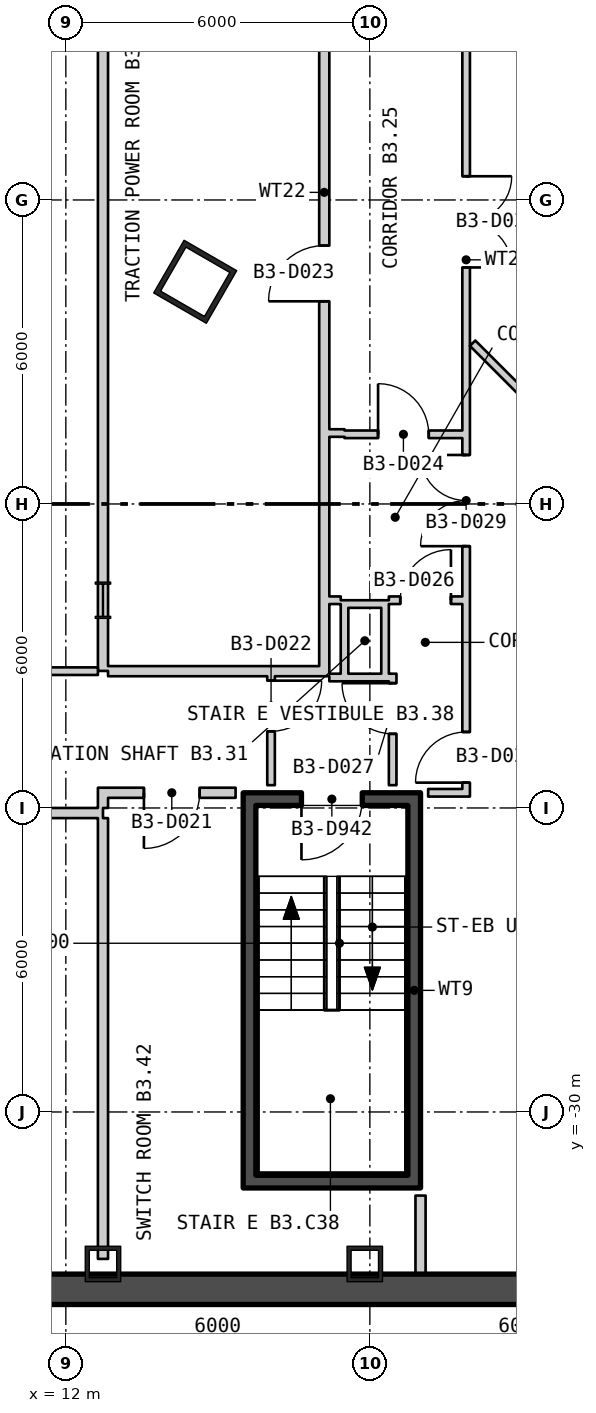
"""IFC4 building model, lengths in metres.
Left out: names, types, materials, properties, quantities, classifications, styles, units other than length and angle.
Written with IfcOpenShell. Run it as: python <this file> out.ifc"""

import sys

from ifc_helpers import new_model, si_unit, direction, frame, frame_2d, origin, origin_2d, place, context, subcontext, project, spatial, rectangle, hollow_rectangle, i_section, extrude, element, fill, save


model = new_model("IFC4")
c1 = context("Model", 3, precision=1e-05, world=origin(), true_north=direction((0.0, 1.0)))
c2 = subcontext(c1, "Body", "Model", "MODEL_VIEW")
j1 = project(units=[si_unit("LENGTHUNIT", "METRE"), si_unit("PLANEANGLEUNIT", "RADIAN")], contexts=[c1])
p1 = place(None, origin())
s1 = spatial("IfcSite", under=j1, at=p1, CompositionType="ELEMENT")
p2 = place(p1, origin())
s2 = spatial("IfcBuilding", under=s1, at=p2, CompositionType="ELEMENT")
p3 = place(p2, frame((0.0, 0.0, -16.8)))
s3 = spatial("IfcBuildingStorey", under=s2, at=p3, CompositionType="ELEMENT", Elevation=-16.8)
p4 = place(p3, frame((14.553, -13.615, 0.0), z_axis=(0.0, 0.0, 1.0), x_axis=(0.5, 0.866025403784, 0.0)))
e1 = element("IfcColumn", 1, at=p4, inside=s3, PredefinedType="COLUMN", context=c2, shape_type="SweptSolid", body=[
    extrude(hollow_rectangle(XDim=1.2, YDim=1.2, WallThickness=0.1, at=origin_2d()), origin(), (0.0, 0.0, 1.0), 5.4),
])
for number, where, z_axis, x_axis in (
    (2, (12.733, -33.0, 0.0), (0.0, 0.0, 1.0), (1.0, 0.0, 0.0)),
    (3, (17.9, -33.0, 0.0), (0.0, 0.0, 1.0), (1.0, 0.0, 0.0)),
):
    element("IfcColumn", number, at=place(p3, frame(where, z_axis=z_axis, x_axis=x_axis)), inside=s3, PredefinedType="COLUMN", context=c2, shape_type="SweptSolid", body=[
        extrude(hollow_rectangle(XDim=0.7, YDim=0.7, WallThickness=0.08, at=origin_2d()), origin(), (0.0, 0.0, 1.0), 5.4),
    ])
p5 = place(p3, frame((12.733, -19.9, 0.0), z_axis=(0.0, 0.0, 1.0), x_axis=(1.0, 0.0, 0.0)))
e4 = element("IfcColumn", 4, at=p5, inside=s3, PredefinedType="COLUMN", context=c2, shape_type="SweptSolid", body=[
    extrude(i_section(OverallWidth=0.304, OverallDepth=0.716, WebThickness=0.021, FlangeThickness=0.04, at=origin_2d()), origin(), (0.0, 0.0, 1.0), 5.4),
])
p6 = place(p3, frame((-39.0, -33.5, -0.4), z_axis=(0.0, 0.0, 1.0), x_axis=(1.0, 0.0, 0.0)))
e5 = element("IfcWall", 5, at=p6, inside=s3, PredefinedType="STANDARD", context=c2, shape_type="SweptSolid", body=[
    extrude(rectangle(XDim=78.0, YDim=0.6, at=frame_2d((39.0, 0.0))), origin(), (0.0, 0.0, 1.0), 5.4),
])
for number, where, z_axis, x_axis in (
    (6, (15.625, -31.25, 0.0), (0.0, 0.0, 1.0), (0.0, 1.0, 0.0)),
    (7, (18.875, -31.25, 0.0), (0.0, 0.0, 1.0), (0.0, 1.0, 0.0)),
):
    element("IfcWall", number, at=place(p3, frame(where, z_axis=z_axis, x_axis=x_axis)), inside=s3, PredefinedType="SHEAR", context=c2, shape_type="SweptSolid", body=[
        extrude(rectangle(XDim=7.3, YDim=0.25, at=frame_2d((3.65, 0.0))), origin(), (0.0, 0.0, 1.0), 4.95),
    ])
p7 = place(p3, frame((15.5, -31.375, 0.0), z_axis=(0.0, 0.0, 1.0), x_axis=(1.0, 0.0, 0.0)))
e8 = element("IfcWall", 8, at=p7, inside=s3, PredefinedType="SHEAR", context=c2, shape_type="SweptSolid", body=[
    extrude(rectangle(XDim=3.5, YDim=0.25, at=frame_2d((1.75, 0.0))), origin(), (0.0, 0.0, 1.0), 4.95),
])
p8 = place(p3, frame((15.5, -23.825, 0.0), z_axis=(0.0, 0.0, 1.0), x_axis=(1.0, 0.0, 0.0)))
e9 = element("IfcWall", 9, at=p8, inside=s3, PredefinedType="SHEAR", context=c2, shape_type="SweptSolid", body=[
    extrude(rectangle(XDim=3.5, YDim=0.25, at=frame_2d((1.75, 0.0))), origin(), (0.0, 0.0, 1.0), 4.95),
])
p9 = place(p8, frame((1.15, 0.0, 0.0)))
e10 = element("IfcOpeningElement", 10, at=p9, cuts=e9, PredefinedType="OPENING", context=c2, shape_type="SweptSolid", body=[
    extrude(rectangle(XDim=1.2, YDim=2.1, at=frame_2d((0.6, 1.05))), frame((0.0, 0.135, 0.0), z_axis=(0.0, -1.0, 0.0), x_axis=(1.0, 0.0, 0.0)), (0.0, 0.0, 1.0), 0.27),
])
p10 = place(p3, frame((1.7, -21.3, 0.0), z_axis=(0.0, 0.0, 1.0), x_axis=(1.0, 0.0, 0.0)))
e11 = element("IfcWall", 11, at=p10, inside=s3, PredefinedType="PARTITIONING", context=c2, shape_type="SweptSolid", body=[
    extrude(rectangle(XDim=10.933, YDim=0.15, at=frame_2d((5.466, 0.0))), origin(), (0.0, 0.0, 1.0), 4.95),
])
p11 = place(p3, frame((3.035, -24.1, 0.0), z_axis=(0.0, 0.0, 1.0), x_axis=(1.0, 0.0, 0.0)))
e12 = element("IfcWall", 12, at=p11, inside=s3, PredefinedType="PARTITIONING", context=c2, shape_type="SweptSolid", body=[
    extrude(rectangle(XDim=9.698, YDim=0.2, at=frame_2d((4.849, 0.0))), origin(), (0.0, 0.0, 1.0), 4.95),
])
p12 = place(p11, frame((4.123, 0.0, 0.0)))
e13 = element("IfcOpeningElement", 13, at=p12, cuts=e12, PredefinedType="OPENING", context=c2, shape_type="SweptSolid", body=[
    extrude(rectangle(XDim=1.1, YDim=2.1, at=frame_2d((0.55, 1.05))), frame((0.0, 0.11, 0.0), z_axis=(0.0, -1.0, 0.0), x_axis=(1.0, 0.0, 0.0)), (0.0, 0.0, 1.0), 0.22),
])
p13 = place(p3, frame((12.733, -32.9, 0.0), z_axis=(0.0, 0.0, 1.0), x_axis=(0.0, 1.0, 0.0)))
e14 = element("IfcWall", 14, at=p13, inside=s3, PredefinedType="PARTITIONING", context=c2, shape_type="SweptSolid", body=[
    extrude(rectangle(XDim=8.7, YDim=0.2, at=frame_2d((4.35, 0.0))), origin(), (0.0, 0.0, 1.0), 4.95),
])
p14 = place(p3, frame((12.733, -24.0, 0.0), z_axis=(0.0, 0.0, 1.0), x_axis=(0.0, 1.0, 0.0)))
e15 = element("IfcWall", 15, at=p14, inside=s3, PredefinedType="PARTITIONING", context=c2, shape_type="SweptSolid", body=[
    extrude(rectangle(XDim=0.4, YDim=0.2, at=frame_2d((0.2, 0.0))), origin(), (0.0, 0.0, 1.0), 4.95),
])
p15 = place(p3, frame((12.733, -21.295, 0.0), z_axis=(0.0, 0.0, 1.0), x_axis=(0.0, 1.0, 0.0)))
e16 = element("IfcWall", 16, at=p15, inside=s3, PredefinedType="PARTITIONING", context=c2, shape_type="SweptSolid", body=[
    extrude(rectangle(XDim=13.857, YDim=0.2, at=frame_2d((6.928, 0.0))), origin(), (0.0, 0.0, 1.0), 4.95),
])
p16 = place(p3, frame((12.833, -23.7, 0.0), z_axis=(0.0, 0.0, 1.0), x_axis=(1.0, 0.0, 0.0)))
e17 = element("IfcWall", 17, at=p16, inside=s3, PredefinedType="PARTITIONING", context=c2, shape_type="SweptSolid", body=[
    extrude(rectangle(XDim=2.517, YDim=0.2, at=frame_2d((1.258, 0.0))), origin(), (0.0, 0.0, 1.0), 4.95),
])
p17 = place(p16, frame((0.708, 0.0, 0.0)))
e18 = element("IfcOpeningElement", 18, at=p17, cuts=e17, PredefinedType="OPENING", context=c2, shape_type="SweptSolid", body=[
    extrude(rectangle(XDim=1.1, YDim=2.1, at=frame_2d((0.55, 1.05))), frame((0.0, 0.11, 0.0), z_axis=(0.0, -1.0, 0.0), x_axis=(1.0, 0.0, 0.0)), (0.0, 0.0, 1.0), 0.22),
])
p18 = place(p3, frame((12.833, -21.3, 0.0), z_axis=(0.0, 0.0, 1.0), x_axis=(1.0, 0.0, 0.0)))
e19 = element("IfcWall", 19, at=p18, inside=s3, PredefinedType="PARTITIONING", context=c2, shape_type="SweptSolid", body=[
    extrude(rectangle(XDim=4.167, YDim=0.2, at=frame_2d((2.083, 0.0))), origin(), (0.0, 0.0, 1.0), 4.95),
])
p19 = place(p3, frame((16.05, -23.55, 0.0), z_axis=(0.0, 0.0, 1.0), x_axis=(0.0, 1.0, 0.0)))
e20 = element("IfcWall", 20, at=p19, inside=s3, PredefinedType="PARTITIONING", context=c2, shape_type="SweptSolid", body=[
    extrude(rectangle(XDim=2.15, YDim=0.15, at=frame_2d((1.075, 0.0))), origin(), (0.0, 0.0, 1.0), 4.95),
])
p20 = place(p19, frame((1.063, 0.0, 0.0)))
e21 = element("IfcOpeningElement", 21, at=p20, cuts=e20, PredefinedType="OPENING", context=c2, shape_type="SweptSolid", body=[
    extrude(rectangle(XDim=1.0, YDim=2.1, at=frame_2d((0.5, 1.05))), frame((0.0, 0.085, 0.0), z_axis=(0.0, -1.0, 0.0), x_axis=(1.0, 0.0, 0.0)), (0.0, 0.0, 1.0), 0.17),
])
p21 = place(p3, frame((17.1, -21.4, 0.0), z_axis=(0.0, 0.0, 1.0), x_axis=(0.0, 1.0, 0.0)))
e22 = element("IfcWall", 22, at=p21, inside=s3, PredefinedType="PARTITIONING", context=c2, shape_type="SweptSolid", body=[
    extrude(rectangle(XDim=19.1, YDim=0.2, at=frame_2d((9.55, 0.0))), origin(), (0.0, 0.0, 1.0), 4.95),
])
p22 = place(p21, frame((7.4, 0.0, 0.0)))
e23 = element("IfcOpeningElement", 23, at=p22, cuts=e22, PredefinedType="OPENING", context=c2, shape_type="SweptSolid", body=[
    extrude(rectangle(XDim=1.1, YDim=2.1, at=frame_2d((0.55, 1.05))), frame((0.0, 0.11, 0.0), z_axis=(0.0, -1.0, 0.0), x_axis=(1.0, 0.0, 0.0)), (0.0, 0.0, 1.0), 0.22),
])
for number, where, z_axis, x_axis in (
    (24, (17.2, -21.425, 0.0), (0.0, 0.0, 1.0), (1.0, 0.0, 0.0)),
    (25, (17.2, -19.9, 0.0), (0.0, 0.0, 1.0), (1.0, 0.0, 0.0)),
):
    element("IfcWall", number, at=place(p3, frame(where, z_axis=z_axis, x_axis=x_axis)), inside=s3, PredefinedType="PARTITIONING", context=c2, shape_type="SweptSolid", body=[
        extrude(rectangle(XDim=0.225, YDim=0.15, at=frame_2d((0.113, 0.0))), origin(), (0.0, 0.0, 1.0), 4.95),
    ])
p23 = place(p3, frame((17.2, -16.6, 0.0), z_axis=(0.0, 0.0, 1.0), x_axis=(1.0, 0.0, 0.0)))
e26 = element("IfcWall", 26, at=p23, inside=s3, PredefinedType="PARTITIONING", context=c2, shape_type="SweptSolid", body=[
    extrude(rectangle(XDim=0.3, YDim=0.15, at=frame_2d((0.15, 0.0))), origin(), (0.0, 0.0, 1.0), 4.95),
])
p24 = place(p3, frame((17.5, -21.5, 0.0), z_axis=(0.0, 0.0, 1.0), x_axis=(0.0, 1.0, 0.0)))
e27 = element("IfcWall", 27, at=p24, inside=s3, PredefinedType="PARTITIONING", context=c2, shape_type="SweptSolid", body=[
    extrude(rectangle(XDim=1.6, YDim=0.15, at=frame_2d((0.8, 0.0))), origin(), (0.0, 0.0, 1.0), 4.95),
])
p25 = place(p3, frame((17.5, -16.625, 0.0), z_axis=(0.0, 0.0, 1.0), x_axis=(1.0, 0.0, 0.0)))
e28 = element("IfcWall", 28, at=p25, inside=s3, PredefinedType="PARTITIONING", context=c2, shape_type="SweptSolid", body=[
    extrude(rectangle(XDim=2.325, YDim=0.15, at=frame_2d((1.163, 0.0))), origin(), (0.0, 0.0, 1.0), 4.95),
])
p26 = place(p25, frame((0.662, 0.0, 0.0)))
e29 = element("IfcOpeningElement", 29, at=p26, cuts=e28, PredefinedType="OPENING", context=c2, shape_type="SweptSolid", body=[
    extrude(rectangle(XDim=1.0, YDim=2.1, at=frame_2d((0.5, 1.05))), frame((0.0, 0.085, 0.0), z_axis=(0.0, -1.0, 0.0), x_axis=(1.0, 0.0, 0.0)), (0.0, 0.0, 1.0), 0.17),
])
for number, where, z_axis, x_axis in (
    (30, (17.575, -21.425, 0.0), (0.0, 0.0, 1.0), (1.0, 0.0, 0.0)),
    (31, (17.575, -19.975, 0.0), (0.0, 0.0, 1.0), (1.0, 0.0, 0.0)),
):
    element("IfcWall", number, at=place(p3, frame(where, z_axis=z_axis, x_axis=x_axis)), inside=s3, PredefinedType="PARTITIONING", context=c2, shape_type="SweptSolid", body=[
        extrude(rectangle(XDim=0.65, YDim=0.15, at=frame_2d((0.325, 0.0))), origin(), (0.0, 0.0, 1.0), 4.95),
    ])
p27 = place(p3, frame((18.3, -21.5, 0.0), z_axis=(0.0, 0.0, 1.0), x_axis=(0.0, 1.0, 0.0)))
e32 = element("IfcWall", 32, at=p27, inside=s3, PredefinedType="PARTITIONING", context=c2, shape_type="SweptSolid", body=[
    extrude(rectangle(XDim=1.6, YDim=0.15, at=frame_2d((0.8, 0.0))), origin(), (0.0, 0.0, 1.0), 4.95),
])
p28 = place(p3, frame((18.375, -19.9, 0.0), z_axis=(0.0, 0.0, 1.0), x_axis=(1.0, 0.0, 0.0)))
e33 = element("IfcWall", 33, at=p28, inside=s3, PredefinedType="PARTITIONING", context=c2, shape_type="SweptSolid", body=[
    extrude(rectangle(XDim=1.45, YDim=0.15, at=frame_2d((0.725, 0.0))), origin(), (0.0, 0.0, 1.0), 4.95),
])
p29 = place(p28, frame((0.225, 0.0, 0.0)))
e34 = element("IfcOpeningElement", 34, at=p29, cuts=e33, PredefinedType="OPENING", context=c2, shape_type="SweptSolid", body=[
    extrude(rectangle(XDim=1.0, YDim=2.1, at=frame_2d((0.5, 1.05))), frame((0.0, 0.085, 0.0), z_axis=(0.0, -1.0, 0.0), x_axis=(1.0, 0.0, 0.0)), (0.0, 0.0, 1.0), 0.17),
])
p30 = place(p3, frame((18.45, -23.55, 0.0), z_axis=(0.0, 0.0, 1.0), x_axis=(0.0, 1.0, 0.0)))
e35 = element("IfcWall", 35, at=p30, inside=s3, PredefinedType="PARTITIONING", context=c2, shape_type="SweptSolid", body=[
    extrude(rectangle(XDim=2.2, YDim=0.15, at=frame_2d((1.1, 0.0))), origin(), (0.0, 0.0, 1.0), 4.95),
])
p31 = place(p30, frame((1.013, 0.0, 0.0)))
e36 = element("IfcOpeningElement", 36, at=p31, cuts=e35, PredefinedType="OPENING", context=c2, shape_type="SweptSolid", body=[
    extrude(rectangle(XDim=1.0, YDim=2.1, at=frame_2d((0.5, 1.05))), frame((0.0, 0.085, 0.0), z_axis=(0.0, -1.0, 0.0), x_axis=(1.0, 0.0, 0.0)), (0.0, 0.0, 1.0), 0.17),
])
p32 = place(p3, frame((19.0, -33.348, 0.0), z_axis=(0.0, 0.0, 1.0), x_axis=(0.0, 1.0, 0.0)))
e37 = element("IfcWall", 37, at=p32, inside=s3, PredefinedType="PARTITIONING", context=c2, shape_type="SweptSolid", body=[
    extrude(rectangle(XDim=1.698, YDim=0.2, at=frame_2d((0.849, 0.0))), origin(), (0.0, 0.0, 1.0), 4.95),
])
p33 = place(p3, frame((19.15, -23.7, 0.0), z_axis=(0.0, 0.0, 1.0), x_axis=(1.0, 0.0, 0.0)))
e38 = element("IfcWall", 38, at=p33, inside=s3, PredefinedType="PARTITIONING", context=c2, shape_type="SweptSolid", body=[
    extrude(rectangle(XDim=0.675, YDim=0.15, at=frame_2d((0.338, 0.0))), origin(), (0.0, 0.0, 1.0), 4.95),
])
p34 = place(p3, frame((19.9, -23.775, 0.0), z_axis=(0.0, 0.0, 1.0), x_axis=(0.0, 1.0, 0.0)))
e39 = element("IfcWall", 39, at=p34, inside=s3, PredefinedType="PARTITIONING", context=c2, shape_type="SweptSolid", body=[
    extrude(rectangle(XDim=21.187, YDim=0.15, at=frame_2d((10.594, 0.0))), origin(), (0.0, 0.0, 1.0), 4.95),
])
p35 = place(p34, frame((0.275, 0.0, 0.0)))
e40 = element("IfcOpeningElement", 40, at=p35, cuts=e39, PredefinedType="OPENING", context=c2, shape_type="SweptSolid", body=[
    extrude(rectangle(XDim=1.0, YDim=2.1, at=frame_2d((0.5, 1.05))), frame((0.0, 0.085, 0.0), z_axis=(0.0, -1.0, 0.0), x_axis=(1.0, 0.0, 0.0)), (0.0, 0.0, 1.0), 0.17),
])
p36 = place(p34, frame((4.942, 0.0, 0.0)))
e41 = element("IfcOpeningElement", 41, at=p36, cuts=e39, PredefinedType="OPENING", context=c2, shape_type="SweptSolid", body=[
    extrude(rectangle(XDim=1.8, YDim=2.1, at=frame_2d((0.9, 1.05))), frame((0.0, 0.085, 0.0), z_axis=(0.0, -1.0, 0.0), x_axis=(1.0, 0.0, 0.0)), (0.0, 0.0, 1.0), 0.17),
])
p37 = place(p34, frame((10.443, 0.0, 0.0)))
e42 = element("IfcOpeningElement", 42, at=p37, cuts=e39, PredefinedType="OPENING", context=c2, shape_type="SweptSolid", body=[
    extrude(rectangle(XDim=1.8, YDim=2.1, at=frame_2d((0.9, 1.05))), frame((0.0, 0.085, 0.0), z_axis=(0.0, -1.0, 0.0), x_axis=(1.0, 0.0, 0.0)), (0.0, 0.0, 1.0), 0.17),
])
p38 = place(p34, frame((19.062, 0.0, 0.0)))
e43 = element("IfcOpeningElement", 43, at=p38, cuts=e39, PredefinedType="OPENING", context=c2, shape_type="SweptSolid", body=[
    extrude(rectangle(XDim=1.0, YDim=2.1, at=frame_2d((0.5, 1.05))), frame((0.0, 0.085, 0.0), z_axis=(0.0, -1.0, 0.0), x_axis=(1.0, 0.0, 0.0)), (0.0, 0.0, 1.0), 0.17),
])
p39 = place(p3, frame((20.028, -14.827, 0.0), z_axis=(0.0, 0.0, 1.0), x_axis=(0.707106781187, -0.707106781187, 0.0)))
e44 = element("IfcWall", 44, at=p39, inside=s3, PredefinedType="PARTITIONING", context=c2, shape_type="SweptSolid", body=[
    extrude(rectangle(XDim=7.068, YDim=0.15, at=frame_2d((3.534, 0.0))), origin(), (0.0, 0.0, 1.0), 4.95),
])
p40 = place(p9, origin())
e45 = element("IfcDoor", 45, at=p40, inside=s3, OperationType="SINGLE_SWING_LEFT", PredefinedType="DOOR", context=c2, shape_type="SweptSolid", body=[
    extrude(rectangle(XDim=1.2, YDim=2.1, at=frame_2d((0.6, 1.05))), frame((0.0, 0.025, 0.0), z_axis=(0.0, -1.0, 0.0), x_axis=(1.0, 0.0, 0.0)), (0.0, 0.0, 1.0), 0.05),
])
fill(e10, e45)
p41 = place(p17, origin())
e46 = element("IfcDoor", 46, at=p41, inside=s3, OperationType="SINGLE_SWING_LEFT", PredefinedType="DOOR", context=c2, shape_type="SweptSolid", body=[
    extrude(rectangle(XDim=1.1, YDim=2.1, at=frame_2d((0.55, 1.05))), frame((0.0, 0.025, 0.0), z_axis=(0.0, -1.0, 0.0), x_axis=(1.0, 0.0, 0.0)), (0.0, 0.0, 1.0), 0.05),
])
fill(e18, e46)
p42 = place(p20, origin())
e47 = element("IfcDoor", 47, at=p42, inside=s3, OperationType="SINGLE_SWING_RIGHT", PredefinedType="DOOR", context=c2, shape_type="SweptSolid", body=[
    extrude(rectangle(XDim=1.0, YDim=2.1, at=frame_2d((0.5, 1.05))), frame((0.0, 0.025, 0.0), z_axis=(0.0, -1.0, 0.0), x_axis=(1.0, 0.0, 0.0)), (0.0, 0.0, 1.0), 0.05),
])
fill(e21, e47)
p43 = place(p22, origin())
e48 = element("IfcDoor", 48, at=p43, inside=s3, OperationType="SINGLE_SWING_RIGHT", PredefinedType="DOOR", context=c2, shape_type="SweptSolid", body=[
    extrude(rectangle(XDim=1.1, YDim=2.1, at=frame_2d((0.55, 1.05))), frame((0.0, 0.025, 0.0), z_axis=(0.0, -1.0, 0.0), x_axis=(1.0, 0.0, 0.0)), (0.0, 0.0, 1.0), 0.05),
])
fill(e23, e48)
p44 = place(p26, origin())
e49 = element("IfcDoor", 49, at=p44, inside=s3, OperationType="SINGLE_SWING_RIGHT", PredefinedType="DOOR", context=c2, shape_type="SweptSolid", body=[
    extrude(rectangle(XDim=1.0, YDim=2.1, at=frame_2d((0.5, 1.05))), frame((0.0, 0.025, 0.0), z_axis=(0.0, -1.0, 0.0), x_axis=(1.0, 0.0, 0.0)), (0.0, 0.0, 1.0), 0.05),
])
fill(e29, e49)
p45 = place(p29, origin())
e50 = element("IfcDoor", 50, at=p45, inside=s3, OperationType="SINGLE_SWING_LEFT", PredefinedType="DOOR", context=c2, shape_type="SweptSolid", body=[
    extrude(rectangle(XDim=1.0, YDim=2.1, at=frame_2d((0.5, 1.05))), frame((0.0, 0.025, 0.0), z_axis=(0.0, -1.0, 0.0), x_axis=(1.0, 0.0, 0.0)), (0.0, 0.0, 1.0), 0.05),
])
fill(e34, e50)
p46 = place(p31, origin())
e51 = element("IfcDoor", 51, at=p46, inside=s3, OperationType="SINGLE_SWING_LEFT", PredefinedType="DOOR", context=c2, shape_type="SweptSolid", body=[
    extrude(rectangle(XDim=1.0, YDim=2.1, at=frame_2d((0.5, 1.05))), frame((0.0, 0.025, 0.0), z_axis=(0.0, -1.0, 0.0), x_axis=(1.0, 0.0, 0.0)), (0.0, 0.0, 1.0), 0.05),
])
fill(e36, e51)
p47 = place(p35, origin())
e52 = element("IfcDoor", 52, at=p47, inside=s3, OperationType="SINGLE_SWING_RIGHT", PredefinedType="DOOR", context=c2, shape_type="SweptSolid", body=[
    extrude(rectangle(XDim=1.0, YDim=2.1, at=frame_2d((0.5, 1.05))), frame((0.0, 0.025, 0.0), z_axis=(0.0, -1.0, 0.0), x_axis=(1.0, 0.0, 0.0)), (0.0, 0.0, 1.0), 0.05),
])
fill(e40, e52)
p48 = place(p36, origin())
e53 = element("IfcDoor", 53, at=p48, inside=s3, OperationType="DOUBLE_DOOR_SINGLE_SWING", PredefinedType="DOOR", context=c2, shape_type="SweptSolid", body=[
    extrude(rectangle(XDim=1.8, YDim=2.1, at=frame_2d((0.9, 1.05))), frame((0.0, 0.025, 0.0), z_axis=(0.0, -1.0, 0.0), x_axis=(1.0, 0.0, 0.0)), (0.0, 0.0, 1.0), 0.05),
])
fill(e41, e53)
p49 = place(p37, origin())
e54 = element("IfcDoor", 54, at=p49, inside=s3, OperationType="DOUBLE_DOOR_SINGLE_SWING", PredefinedType="DOOR", context=c2, shape_type="SweptSolid", body=[
    extrude(rectangle(XDim=1.8, YDim=2.1, at=frame_2d((0.9, 1.05))), frame((0.0, 0.025, 0.0), z_axis=(0.0, -1.0, 0.0), x_axis=(1.0, 0.0, 0.0)), (0.0, 0.0, 1.0), 0.05),
])
fill(e42, e54)
save(model, sys.argv[1])
